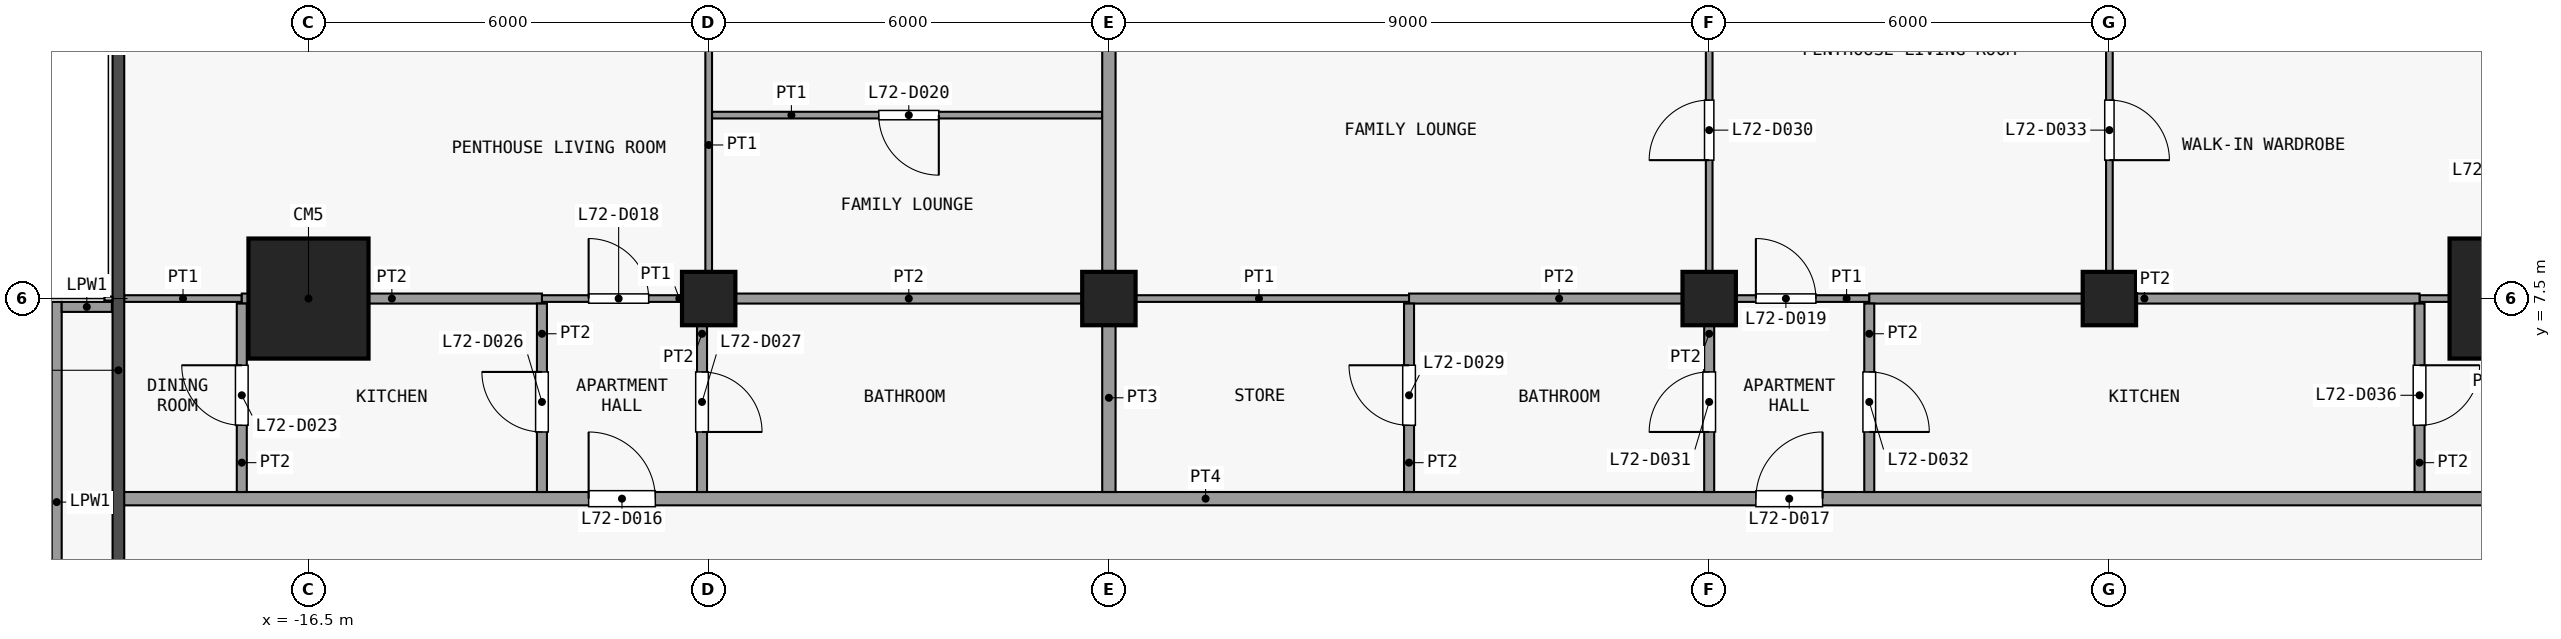
"""IFC4 building model, lengths in metres.
Left out: names, types, materials, properties, quantities, classifications, styles, units other than length and angle.
Written with IfcOpenShell. Run it as: python <this file> out.ifc"""

import sys

from ifc_helpers import new_model, si_unit, direction, frame, frame_2d, origin, origin_2d, place, context, subcontext, project, spatial, rectangle, extrude, element, fill, save


model = new_model("IFC4")
c1 = context("Model", 3, precision=1e-05, world=origin(), true_north=direction((0.0, 1.0)))
c2 = subcontext(c1, "Body", "Model", "MODEL_VIEW")
j1 = project(units=[si_unit("LENGTHUNIT", "METRE"), si_unit("PLANEANGLEUNIT", "RADIAN")], contexts=[c1])
p1 = place(None, origin())
s1 = spatial("IfcSite", under=j1, at=p1, CompositionType="ELEMENT")
p2 = place(p1, origin())
s2 = spatial("IfcBuilding", under=s1, at=p2, CompositionType="ELEMENT")
p3 = place(p2, frame((0.0, 0.0, 284.3)))
s3 = spatial("IfcBuildingStorey", under=s2, at=p3, CompositionType="ELEMENT", Elevation=284.3)
p4 = place(p3, frame((-16.5, 7.5, 0.0), z_axis=(0.0, 0.0, 1.0), x_axis=(1.0, 0.0, 0.0)))
e1 = element("IfcColumn", 1, at=p4, inside=s3, PredefinedType="COLUMN", context=c2, shape_type="SweptSolid", body=[
    extrude(rectangle(XDim=1.8, YDim=1.8, at=origin_2d()), origin(), (0.0, 0.0, 1.0), 3.6),
])
for number, where, z_axis, x_axis in (
    (2, (-10.5, 7.5, 0.0), (0.0, 0.0, 1.0), (1.0, 0.0, 0.0)),
    (3, (-4.5, 7.5, 0.0), (0.0, 0.0, 1.0), (1.0, 0.0, 0.0)),
    (4, (4.5, 7.5, 0.0), (0.0, 0.0, 1.0), (1.0, 0.0, 0.0)),
    (5, (10.5, 7.5, 0.0), (0.0, 0.0, 1.0), (1.0, 0.0, 0.0)),
):
    element("IfcColumn", number, at=place(p3, frame(where, z_axis=z_axis, x_axis=x_axis)), inside=s3, PredefinedType="COLUMN", context=c2, shape_type="SweptSolid", body=[
        extrude(rectangle(XDim=0.8, YDim=0.8, at=origin_2d()), origin(), (0.0, 0.0, 1.0), 3.6),
    ])
p5 = place(p3, frame((16.5, 7.5, 0.0), z_axis=(0.0, 0.0, 1.0), x_axis=(1.0, 0.0, 0.0)))
e6 = element("IfcColumn", 6, at=p5, inside=s3, PredefinedType="COLUMN", context=c2, shape_type="SweptSolid", body=[
    extrude(rectangle(XDim=1.8, YDim=1.8, at=origin_2d()), origin(), (0.0, 0.0, 1.0), 3.6),
])
p6 = place(p3, frame((-20.275, 1.448, 0.0), z_axis=(0.0, 0.0, 1.0), x_axis=(0.0, 1.0, 0.0)))
e7 = element("IfcWall", 7, at=p6, inside=s3, PredefinedType="PARAPET", context=c2, shape_type="SweptSolid", body=[
    extrude(rectangle(XDim=6.002, YDim=0.15, at=frame_2d((3.001, 0.0))), origin(), (0.0, 0.0, 1.0), 1.15),
])
p7 = place(p3, frame((-20.2, 7.375, 0.0), z_axis=(0.0, 0.0, 1.0), x_axis=(1.0, 0.0, 0.0)))
e8 = element("IfcWall", 8, at=p7, inside=s3, PredefinedType="PARAPET", context=c2, shape_type="SweptSolid", body=[
    extrude(rectangle(XDim=0.752, YDim=0.15, at=frame_2d((0.376, 0.0))), origin(), (0.0, 0.0, 1.0), 1.15),
])
p8 = place(p3, frame((-19.35, 4.5, 0.0), z_axis=(0.0, 0.0, 1.0), x_axis=(1.0, 0.0, 0.0)))
e9 = element("IfcWall", 9, at=p8, inside=s3, PredefinedType="PARTITIONING", context=c2, shape_type="SweptSolid", body=[
    extrude(rectangle(XDim=38.7, YDim=0.2, at=frame_2d((19.35, 0.0))), origin(), (0.0, 0.0, 1.0), 3.3),
])
p9 = place(p8, frame((7.05, 0.0, 0.0)))
e10 = element("IfcOpeningElement", 10, at=p9, cuts=e9, PredefinedType="OPENING", context=c2, shape_type="SweptSolid", body=[
    extrude(rectangle(XDim=1.0, YDim=2.1, at=frame_2d((0.5, 1.05))), frame((0.0, 0.11, 0.0), z_axis=(0.0, -1.0, 0.0), x_axis=(1.0, 0.0, 0.0)), (0.0, 0.0, 1.0), 0.22),
])
p10 = place(p8, frame((24.55, 0.0, 0.0)))
e11 = element("IfcOpeningElement", 11, at=p10, cuts=e9, PredefinedType="OPENING", context=c2, shape_type="SweptSolid", body=[
    extrude(rectangle(XDim=1.0, YDim=2.1, at=frame_2d((0.5, 1.05))), frame((0.0, 0.11, 0.0), z_axis=(0.0, -1.0, 0.0), x_axis=(1.0, 0.0, 0.0)), (0.0, 0.0, 1.0), 0.22),
])
p11 = place(p3, frame((-19.262, 7.5, 0.0), z_axis=(0.0, 0.0, 1.0), x_axis=(1.0, 0.0, 0.0)))
e12 = element("IfcWall", 12, at=p11, inside=s3, PredefinedType="PARTITIONING", context=c2, shape_type="SweptSolid", body=[
    extrude(rectangle(XDim=1.762, YDim=0.1, at=frame_2d((0.881, 0.0))), origin(), (0.0, 0.0, 1.0), 3.3),
])
p12 = place(p3, frame((-13.0, 7.5, 0.0), z_axis=(0.0, 0.0, 1.0), x_axis=(1.0, 0.0, 0.0)))
e13 = element("IfcWall", 13, at=p12, inside=s3, PredefinedType="PARTITIONING", context=c2, shape_type="SweptSolid", body=[
    extrude(rectangle(XDim=2.4, YDim=0.1, at=frame_2d((1.2, 0.0))), origin(), (0.0, 0.0, 1.0), 3.3),
])
p13 = place(p12, frame((0.7, 0.0, 0.0)))
e14 = element("IfcOpeningElement", 14, at=p13, cuts=e13, PredefinedType="OPENING", context=c2, shape_type="SweptSolid", body=[
    extrude(rectangle(XDim=0.9, YDim=2.1, at=frame_2d((0.45, 1.05))), frame((0.0, 0.06, 0.0), z_axis=(0.0, -1.0, 0.0), x_axis=(1.0, 0.0, 0.0)), (0.0, 0.0, 1.0), 0.12),
])
p14 = place(p3, frame((-4.5, 7.5, 0.0), z_axis=(0.0, 0.0, 1.0), x_axis=(1.0, 0.0, 0.0)))
e15 = element("IfcWall", 15, at=p14, inside=s3, PredefinedType="PARTITIONING", context=c2, shape_type="SweptSolid", body=[
    extrude(rectangle(XDim=4.5, YDim=0.1, at=frame_2d((2.25, 0.0))), origin(), (0.0, 0.0, 1.0), 3.3),
])
p15 = place(p3, frame((4.5, 7.5, 0.0), z_axis=(0.0, 0.0, 1.0), x_axis=(1.0, 0.0, 0.0)))
e16 = element("IfcWall", 16, at=p15, inside=s3, PredefinedType="PARTITIONING", context=c2, shape_type="SweptSolid", body=[
    extrude(rectangle(XDim=2.4, YDim=0.1, at=frame_2d((1.2, 0.0))), origin(), (0.0, 0.0, 1.0), 3.3),
])
p16 = place(p15, frame((0.7, 0.0, 0.0)))
e17 = element("IfcOpeningElement", 17, at=p16, cuts=e16, PredefinedType="OPENING", context=c2, shape_type="SweptSolid", body=[
    extrude(rectangle(XDim=0.9, YDim=2.1, at=frame_2d((0.45, 1.05))), frame((0.0, 0.06, 0.0), z_axis=(0.0, -1.0, 0.0), x_axis=(1.0, 0.0, 0.0)), (0.0, 0.0, 1.0), 0.12),
])
p17 = place(p3, frame((15.15, 7.5, 0.0), z_axis=(0.0, 0.0, 1.0), x_axis=(1.0, 0.0, 0.0)))
e18 = element("IfcWall", 18, at=p17, inside=s3, PredefinedType="PARTITIONING", context=c2, shape_type="SweptSolid", body=[
    extrude(rectangle(XDim=2.05, YDim=0.1, at=frame_2d((1.025, 0.0))), origin(), (0.0, 0.0, 1.0), 3.3),
])
p18 = place(p3, frame((-17.5, 7.5, 0.0), z_axis=(0.0, 0.0, 1.0), x_axis=(1.0, 0.0, 0.0)))
e19 = element("IfcWall", 19, at=p18, inside=s3, PredefinedType="PARTITIONING", context=c2, shape_type="SweptSolid", body=[
    extrude(rectangle(XDim=4.5, YDim=0.15, at=frame_2d((2.25, 0.0))), origin(), (0.0, 0.0, 1.0), 3.3),
])
p19 = place(p3, frame((-10.5, 7.5, 0.0), z_axis=(0.0, 0.0, 1.0), x_axis=(1.0, 0.0, 0.0)))
e20 = element("IfcWall", 20, at=p19, inside=s3, PredefinedType="PARTITIONING", context=c2, shape_type="SweptSolid", body=[
    extrude(rectangle(XDim=6.0, YDim=0.15, at=frame_2d((3.0, 0.0))), origin(), (0.0, 0.0, 1.0), 3.3),
])
p20 = place(p3, frame((0.0, 7.5, 0.0), z_axis=(0.0, 0.0, 1.0), x_axis=(1.0, 0.0, 0.0)))
e21 = element("IfcWall", 21, at=p20, inside=s3, PredefinedType="PARTITIONING", context=c2, shape_type="SweptSolid", body=[
    extrude(rectangle(XDim=4.5, YDim=0.15, at=frame_2d((2.25, 0.0))), origin(), (0.0, 0.0, 1.0), 3.3),
])
p21 = place(p3, frame((6.9, 7.5, 0.0), z_axis=(0.0, 0.0, 1.0), x_axis=(1.0, 0.0, 0.0)))
e22 = element("IfcWall", 22, at=p21, inside=s3, PredefinedType="PARTITIONING", context=c2, shape_type="SweptSolid", body=[
    extrude(rectangle(XDim=8.25, YDim=0.15, at=frame_2d((4.125, 0.0))), origin(), (0.0, 0.0, 1.0), 3.3),
])
p22 = place(p3, frame((-10.45, 10.25, 0.0), z_axis=(0.0, 0.0, 1.0), x_axis=(1.0, 0.0, 0.0)))
e23 = element("IfcWall", 23, at=p22, inside=s3, PredefinedType="PARTITIONING", context=c2, shape_type="SweptSolid", body=[
    extrude(rectangle(XDim=5.85, YDim=0.1, at=frame_2d((2.925, 0.0))), origin(), (0.0, 0.0, 1.0), 3.3),
])
p23 = place(p22, frame((2.5, 0.0, 0.0)))
e24 = element("IfcOpeningElement", 24, at=p23, cuts=e23, PredefinedType="OPENING", context=c2, shape_type="SweptSolid", body=[
    extrude(rectangle(XDim=0.9, YDim=2.1, at=frame_2d((0.45, 1.05))), frame((0.0, 0.06, 0.0), z_axis=(0.0, -1.0, 0.0), x_axis=(1.0, 0.0, 0.0)), (0.0, 0.0, 1.0), 0.12),
])
p24 = place(p3, frame((-17.5, 4.6, 0.0), z_axis=(0.0, 0.0, 1.0), x_axis=(0.0, 1.0, 0.0)))
e25 = element("IfcWall", 25, at=p24, inside=s3, PredefinedType="PARTITIONING", context=c2, shape_type="SweptSolid", body=[
    extrude(rectangle(XDim=2.825, YDim=0.15, at=frame_2d((1.413, 0.0))), origin(), (0.0, 0.0, 1.0), 3.3),
])
p25 = place(p24, frame((1.0, 0.0, 0.0)))
e26 = element("IfcOpeningElement", 26, at=p25, cuts=e25, PredefinedType="OPENING", context=c2, shape_type="SweptSolid", body=[
    extrude(rectangle(XDim=0.9, YDim=2.1, at=frame_2d((0.45, 1.05))), frame((0.0, 0.085, 0.0), z_axis=(0.0, -1.0, 0.0), x_axis=(1.0, 0.0, 0.0)), (0.0, 0.0, 1.0), 0.17),
])
p26 = place(p3, frame((-13.0, 4.6, 0.0), z_axis=(0.0, 0.0, 1.0), x_axis=(0.0, 1.0, 0.0)))
e27 = element("IfcWall", 27, at=p26, inside=s3, PredefinedType="PARTITIONING", context=c2, shape_type="SweptSolid", body=[
    extrude(rectangle(XDim=2.825, YDim=0.15, at=frame_2d((1.413, 0.0))), origin(), (0.0, 0.0, 1.0), 3.3),
])
p27 = place(p26, frame((0.9, 0.0, 0.0)))
e28 = element("IfcOpeningElement", 28, at=p27, cuts=e27, PredefinedType="OPENING", context=c2, shape_type="SweptSolid", body=[
    extrude(rectangle(XDim=0.9, YDim=2.1, at=frame_2d((0.45, 1.05))), frame((0.0, 0.085, 0.0), z_axis=(0.0, -1.0, 0.0), x_axis=(1.0, 0.0, 0.0)), (0.0, 0.0, 1.0), 0.17),
])
p28 = place(p3, frame((-10.6, 4.6, 0.0), z_axis=(0.0, 0.0, 1.0), x_axis=(0.0, 1.0, 0.0)))
e29 = element("IfcWall", 29, at=p28, inside=s3, PredefinedType="PARTITIONING", context=c2, shape_type="SweptSolid", body=[
    extrude(rectangle(XDim=2.825, YDim=0.15, at=frame_2d((1.413, 0.0))), origin(), (0.0, 0.0, 1.0), 3.3),
])
p29 = place(p28, frame((0.9, 0.0, 0.0)))
e30 = element("IfcOpeningElement", 30, at=p29, cuts=e29, PredefinedType="OPENING", context=c2, shape_type="SweptSolid", body=[
    extrude(rectangle(XDim=0.9, YDim=2.1, at=frame_2d((0.45, 1.05))), frame((0.0, 0.085, 0.0), z_axis=(0.0, -1.0, 0.0), x_axis=(1.0, 0.0, 0.0)), (0.0, 0.0, 1.0), 0.17),
])
p30 = place(p3, frame((-10.5, 7.575, 0.0), z_axis=(0.0, 0.0, 1.0), x_axis=(0.0, 1.0, 0.0)))
e31 = element("IfcWall", 31, at=p30, inside=s3, PredefinedType="PARTITIONING", context=c2, shape_type="SweptSolid", body=[
    extrude(rectangle(XDim=8.688, YDim=0.1, at=frame_2d((4.344, 0.0))), origin(), (0.0, 0.0, 1.0), 3.3),
])
p31 = place(p30, frame((4.575, 0.0, 0.0)))
e32 = element("IfcOpeningElement", 32, at=p31, cuts=e31, PredefinedType="OPENING", context=c2, shape_type="SweptSolid", body=[
    extrude(rectangle(XDim=0.9, YDim=2.1, at=frame_2d((0.45, 1.05))), frame((0.0, 0.06, 0.0), z_axis=(0.0, -1.0, 0.0), x_axis=(1.0, 0.0, 0.0)), (0.0, 0.0, 1.0), 0.12),
])
p32 = place(p3, frame((-4.5, 4.6, 0.0), z_axis=(0.0, 0.0, 1.0), x_axis=(0.0, 1.0, 0.0)))
e33 = element("IfcWall", 33, at=p32, inside=s3, PredefinedType="PARTITIONING", context=c2, shape_type="SweptSolid", body=[
    extrude(rectangle(XDim=2.825, YDim=0.2, at=frame_2d((1.413, 0.0))), origin(), (0.0, 0.0, 1.0), 3.3),
])
p33 = place(p3, frame((-4.5, 7.575, 0.0), z_axis=(0.0, 0.0, 1.0), x_axis=(0.0, 1.0, 0.0)))
e34 = element("IfcWall", 34, at=p33, inside=s3, PredefinedType="PARTITIONING", context=c2, shape_type="SweptSolid", body=[
    extrude(rectangle(XDim=8.688, YDim=0.2, at=frame_2d((4.344, 0.0))), origin(), (0.0, 0.0, 1.0), 3.3),
])
p34 = place(p3, frame((0.0, 4.6, 0.0), z_axis=(0.0, 0.0, 1.0), x_axis=(0.0, 1.0, 0.0)))
e35 = element("IfcWall", 35, at=p34, inside=s3, PredefinedType="PARTITIONING", context=c2, shape_type="SweptSolid", body=[
    extrude(rectangle(XDim=2.825, YDim=0.15, at=frame_2d((1.413, 0.0))), origin(), (0.0, 0.0, 1.0), 3.3),
])
p35 = place(p34, frame((1.0, 0.0, 0.0)))
e36 = element("IfcOpeningElement", 36, at=p35, cuts=e35, PredefinedType="OPENING", context=c2, shape_type="SweptSolid", body=[
    extrude(rectangle(XDim=0.9, YDim=2.1, at=frame_2d((0.45, 1.05))), frame((0.0, 0.085, 0.0), z_axis=(0.0, -1.0, 0.0), x_axis=(1.0, 0.0, 0.0)), (0.0, 0.0, 1.0), 0.17),
])
p36 = place(p3, frame((4.5, 7.575, 0.0), z_axis=(0.0, 0.0, 1.0), x_axis=(0.0, 1.0, 0.0)))
e37 = element("IfcWall", 37, at=p36, inside=s3, PredefinedType="PARTITIONING", context=c2, shape_type="SweptSolid", body=[
    extrude(rectangle(XDim=7.275, YDim=0.1, at=frame_2d((3.638, 0.0))), origin(), (0.0, 0.0, 1.0), 3.3),
])
p37 = place(p36, frame((2.0, 0.0, 0.0)))
e38 = element("IfcOpeningElement", 38, at=p37, cuts=e37, PredefinedType="OPENING", context=c2, shape_type="SweptSolid", body=[
    extrude(rectangle(XDim=0.9, YDim=2.1, at=frame_2d((0.45, 1.05))), frame((0.0, 0.06, 0.0), z_axis=(0.0, -1.0, 0.0), x_axis=(1.0, 0.0, 0.0)), (0.0, 0.0, 1.0), 0.12),
])
p38 = place(p3, frame((4.5, 4.6, 0.0), z_axis=(0.0, 0.0, 1.0), x_axis=(0.0, 1.0, 0.0)))
e39 = element("IfcWall", 39, at=p38, inside=s3, PredefinedType="PARTITIONING", context=c2, shape_type="SweptSolid", body=[
    extrude(rectangle(XDim=2.825, YDim=0.15, at=frame_2d((1.413, 0.0))), origin(), (0.0, 0.0, 1.0), 3.3),
])
p39 = place(p38, frame((0.9, 0.0, 0.0)))
e40 = element("IfcOpeningElement", 40, at=p39, cuts=e39, PredefinedType="OPENING", context=c2, shape_type="SweptSolid", body=[
    extrude(rectangle(XDim=0.9, YDim=2.1, at=frame_2d((0.45, 1.05))), frame((0.0, 0.085, 0.0), z_axis=(0.0, -1.0, 0.0), x_axis=(1.0, 0.0, 0.0)), (0.0, 0.0, 1.0), 0.17),
])
p40 = place(p3, frame((6.9, 4.6, 0.0), z_axis=(0.0, 0.0, 1.0), x_axis=(0.0, 1.0, 0.0)))
e41 = element("IfcWall", 41, at=p40, inside=s3, PredefinedType="PARTITIONING", context=c2, shape_type="SweptSolid", body=[
    extrude(rectangle(XDim=2.825, YDim=0.15, at=frame_2d((1.413, 0.0))), origin(), (0.0, 0.0, 1.0), 3.3),
])
p41 = place(p40, frame((0.9, 0.0, 0.0)))
e42 = element("IfcOpeningElement", 42, at=p41, cuts=e41, PredefinedType="OPENING", context=c2, shape_type="SweptSolid", body=[
    extrude(rectangle(XDim=0.9, YDim=2.1, at=frame_2d((0.45, 1.05))), frame((0.0, 0.085, 0.0), z_axis=(0.0, -1.0, 0.0), x_axis=(1.0, 0.0, 0.0)), (0.0, 0.0, 1.0), 0.17),
])
p42 = place(p3, frame((10.5, 7.575, 0.0), z_axis=(0.0, 0.0, 1.0), x_axis=(0.0, 1.0, 0.0)))
e43 = element("IfcWall", 43, at=p42, inside=s3, PredefinedType="PARTITIONING", context=c2, shape_type="SweptSolid", body=[
    extrude(rectangle(XDim=7.275, YDim=0.1, at=frame_2d((3.638, 0.0))), origin(), (0.0, 0.0, 1.0), 3.3),
])
p43 = place(p42, frame((2.0, 0.0, 0.0)))
e44 = element("IfcOpeningElement", 44, at=p43, cuts=e43, PredefinedType="OPENING", context=c2, shape_type="SweptSolid", body=[
    extrude(rectangle(XDim=0.9, YDim=2.1, at=frame_2d((0.45, 1.05))), frame((0.0, 0.06, 0.0), z_axis=(0.0, -1.0, 0.0), x_axis=(1.0, 0.0, 0.0)), (0.0, 0.0, 1.0), 0.12),
])
p44 = place(p3, frame((15.15, 4.6, 0.0), z_axis=(0.0, 0.0, 1.0), x_axis=(0.0, 1.0, 0.0)))
e45 = element("IfcWall", 45, at=p44, inside=s3, PredefinedType="PARTITIONING", context=c2, shape_type="SweptSolid", body=[
    extrude(rectangle(XDim=2.825, YDim=0.15, at=frame_2d((1.413, 0.0))), origin(), (0.0, 0.0, 1.0), 3.3),
])
p45 = place(p44, frame((1.0, 0.0, 0.0)))
e46 = element("IfcOpeningElement", 46, at=p45, cuts=e45, PredefinedType="OPENING", context=c2, shape_type="SweptSolid", body=[
    extrude(rectangle(XDim=0.9, YDim=2.1, at=frame_2d((0.45, 1.05))), frame((0.0, 0.085, 0.0), z_axis=(0.0, -1.0, 0.0), x_axis=(1.0, 0.0, 0.0)), (0.0, 0.0, 1.0), 0.17),
])
p46 = place(p9, origin())
e47 = element("IfcDoor", 47, at=p46, inside=s3, OperationType="SINGLE_SWING_RIGHT", PredefinedType="DOOR", context=c2, shape_type="SweptSolid", body=[
    extrude(rectangle(XDim=1.0, YDim=2.1, at=frame_2d((0.5, 1.05))), frame((0.0, 0.025, 0.0), z_axis=(0.0, -1.0, 0.0), x_axis=(1.0, 0.0, 0.0)), (0.0, 0.0, 1.0), 0.05),
])
fill(e10, e47)
p47 = place(p10, origin())
e48 = element("IfcDoor", 48, at=p47, inside=s3, OperationType="SINGLE_SWING_LEFT", PredefinedType="DOOR", context=c2, shape_type="SweptSolid", body=[
    extrude(rectangle(XDim=1.0, YDim=2.1, at=frame_2d((0.5, 1.05))), frame((0.0, 0.025, 0.0), z_axis=(0.0, -1.0, 0.0), x_axis=(1.0, 0.0, 0.0)), (0.0, 0.0, 1.0), 0.05),
])
fill(e11, e48)
p48 = place(p13, origin())
e49 = element("IfcDoor", 49, at=p48, inside=s3, OperationType="SINGLE_SWING_RIGHT", PredefinedType="DOOR", context=c2, shape_type="SweptSolid", body=[
    extrude(rectangle(XDim=0.9, YDim=2.1, at=frame_2d((0.45, 1.05))), frame((0.0, 0.025, 0.0), z_axis=(0.0, -1.0, 0.0), x_axis=(1.0, 0.0, 0.0)), (0.0, 0.0, 1.0), 0.05),
])
fill(e14, e49)
p49 = place(p16, origin())
e50 = element("IfcDoor", 50, at=p49, inside=s3, OperationType="SINGLE_SWING_RIGHT", PredefinedType="DOOR", context=c2, shape_type="SweptSolid", body=[
    extrude(rectangle(XDim=0.9, YDim=2.1, at=frame_2d((0.45, 1.05))), frame((0.0, 0.025, 0.0), z_axis=(0.0, -1.0, 0.0), x_axis=(1.0, 0.0, 0.0)), (0.0, 0.0, 1.0), 0.05),
])
fill(e17, e50)
p50 = place(p23, origin())
e51 = element("IfcDoor", 51, at=p50, inside=s3, OperationType="SINGLE_SWING_RIGHT", PredefinedType="DOOR", context=c2, shape_type="SweptSolid", body=[
    extrude(rectangle(XDim=0.9, YDim=2.1, at=frame_2d((0.45, 1.05))), frame((0.0, 0.025, 0.0), z_axis=(0.0, -1.0, 0.0), x_axis=(1.0, 0.0, 0.0)), (0.0, 0.0, 1.0), 0.05),
])
fill(e24, e51)
p51 = place(p25, origin())
e52 = element("IfcDoor", 52, at=p51, inside=s3, OperationType="SINGLE_SWING_LEFT", PredefinedType="DOOR", context=c2, shape_type="SweptSolid", body=[
    extrude(rectangle(XDim=0.9, YDim=2.1, at=frame_2d((0.45, 1.05))), frame((0.0, 0.025, 0.0), z_axis=(0.0, -1.0, 0.0), x_axis=(1.0, 0.0, 0.0)), (0.0, 0.0, 1.0), 0.05),
])
fill(e26, e52)
p52 = place(p27, origin())
e53 = element("IfcDoor", 53, at=p52, inside=s3, OperationType="SINGLE_SWING_LEFT", PredefinedType="DOOR", context=c2, shape_type="SweptSolid", body=[
    extrude(rectangle(XDim=0.9, YDim=2.1, at=frame_2d((0.45, 1.05))), frame((0.0, 0.025, 0.0), z_axis=(0.0, -1.0, 0.0), x_axis=(1.0, 0.0, 0.0)), (0.0, 0.0, 1.0), 0.05),
])
fill(e28, e53)
p53 = place(p29, origin())
e54 = element("IfcDoor", 54, at=p53, inside=s3, OperationType="SINGLE_SWING_LEFT", PredefinedType="DOOR", context=c2, shape_type="SweptSolid", body=[
    extrude(rectangle(XDim=0.9, YDim=2.1, at=frame_2d((0.45, 1.05))), frame((0.0, 0.025, 0.0), z_axis=(0.0, -1.0, 0.0), x_axis=(1.0, 0.0, 0.0)), (0.0, 0.0, 1.0), 0.05),
])
fill(e30, e54)
p54 = place(p35, origin())
e55 = element("IfcDoor", 55, at=p54, inside=s3, OperationType="SINGLE_SWING_LEFT", PredefinedType="DOOR", context=c2, shape_type="SweptSolid", body=[
    extrude(rectangle(XDim=0.9, YDim=2.1, at=frame_2d((0.45, 1.05))), frame((0.0, 0.025, 0.0), z_axis=(0.0, -1.0, 0.0), x_axis=(1.0, 0.0, 0.0)), (0.0, 0.0, 1.0), 0.05),
])
fill(e36, e55)
p55 = place(p37, origin())
e56 = element("IfcDoor", 56, at=p55, inside=s3, OperationType="SINGLE_SWING_RIGHT", PredefinedType="DOOR", context=c2, shape_type="SweptSolid", body=[
    extrude(rectangle(XDim=0.9, YDim=2.1, at=frame_2d((0.45, 1.05))), frame((0.0, 0.025, 0.0), z_axis=(0.0, -1.0, 0.0), x_axis=(1.0, 0.0, 0.0)), (0.0, 0.0, 1.0), 0.05),
])
fill(e38, e56)
p56 = place(p39, origin())
e57 = element("IfcDoor", 57, at=p56, inside=s3, OperationType="SINGLE_SWING_RIGHT", PredefinedType="DOOR", context=c2, shape_type="SweptSolid", body=[
    extrude(rectangle(XDim=0.9, YDim=2.1, at=frame_2d((0.45, 1.05))), frame((0.0, 0.025, 0.0), z_axis=(0.0, -1.0, 0.0), x_axis=(1.0, 0.0, 0.0)), (0.0, 0.0, 1.0), 0.05),
])
fill(e40, e57)
p57 = place(p41, origin())
e58 = element("IfcDoor", 58, at=p57, inside=s3, OperationType="SINGLE_SWING_LEFT", PredefinedType="DOOR", context=c2, shape_type="SweptSolid", body=[
    extrude(rectangle(XDim=0.9, YDim=2.1, at=frame_2d((0.45, 1.05))), frame((0.0, 0.025, 0.0), z_axis=(0.0, -1.0, 0.0), x_axis=(1.0, 0.0, 0.0)), (0.0, 0.0, 1.0), 0.05),
])
fill(e42, e58)
p58 = place(p43, origin())
e59 = element("IfcDoor", 59, at=p58, inside=s3, OperationType="SINGLE_SWING_LEFT", PredefinedType="DOOR", context=c2, shape_type="SweptSolid", body=[
    extrude(rectangle(XDim=0.9, YDim=2.1, at=frame_2d((0.45, 1.05))), frame((0.0, 0.025, 0.0), z_axis=(0.0, -1.0, 0.0), x_axis=(1.0, 0.0, 0.0)), (0.0, 0.0, 1.0), 0.05),
])
fill(e44, e59)
p59 = place(p45, origin())
e60 = element("IfcDoor", 60, at=p59, inside=s3, OperationType="SINGLE_SWING_RIGHT", PredefinedType="DOOR", context=c2, shape_type="SweptSolid", body=[
    extrude(rectangle(XDim=0.9, YDim=2.1, at=frame_2d((0.45, 1.05))), frame((0.0, 0.025, 0.0), z_axis=(0.0, -1.0, 0.0), x_axis=(1.0, 0.0, 0.0)), (0.0, 0.0, 1.0), 0.05),
])
fill(e46, e60)
save(model, sys.argv[1])
